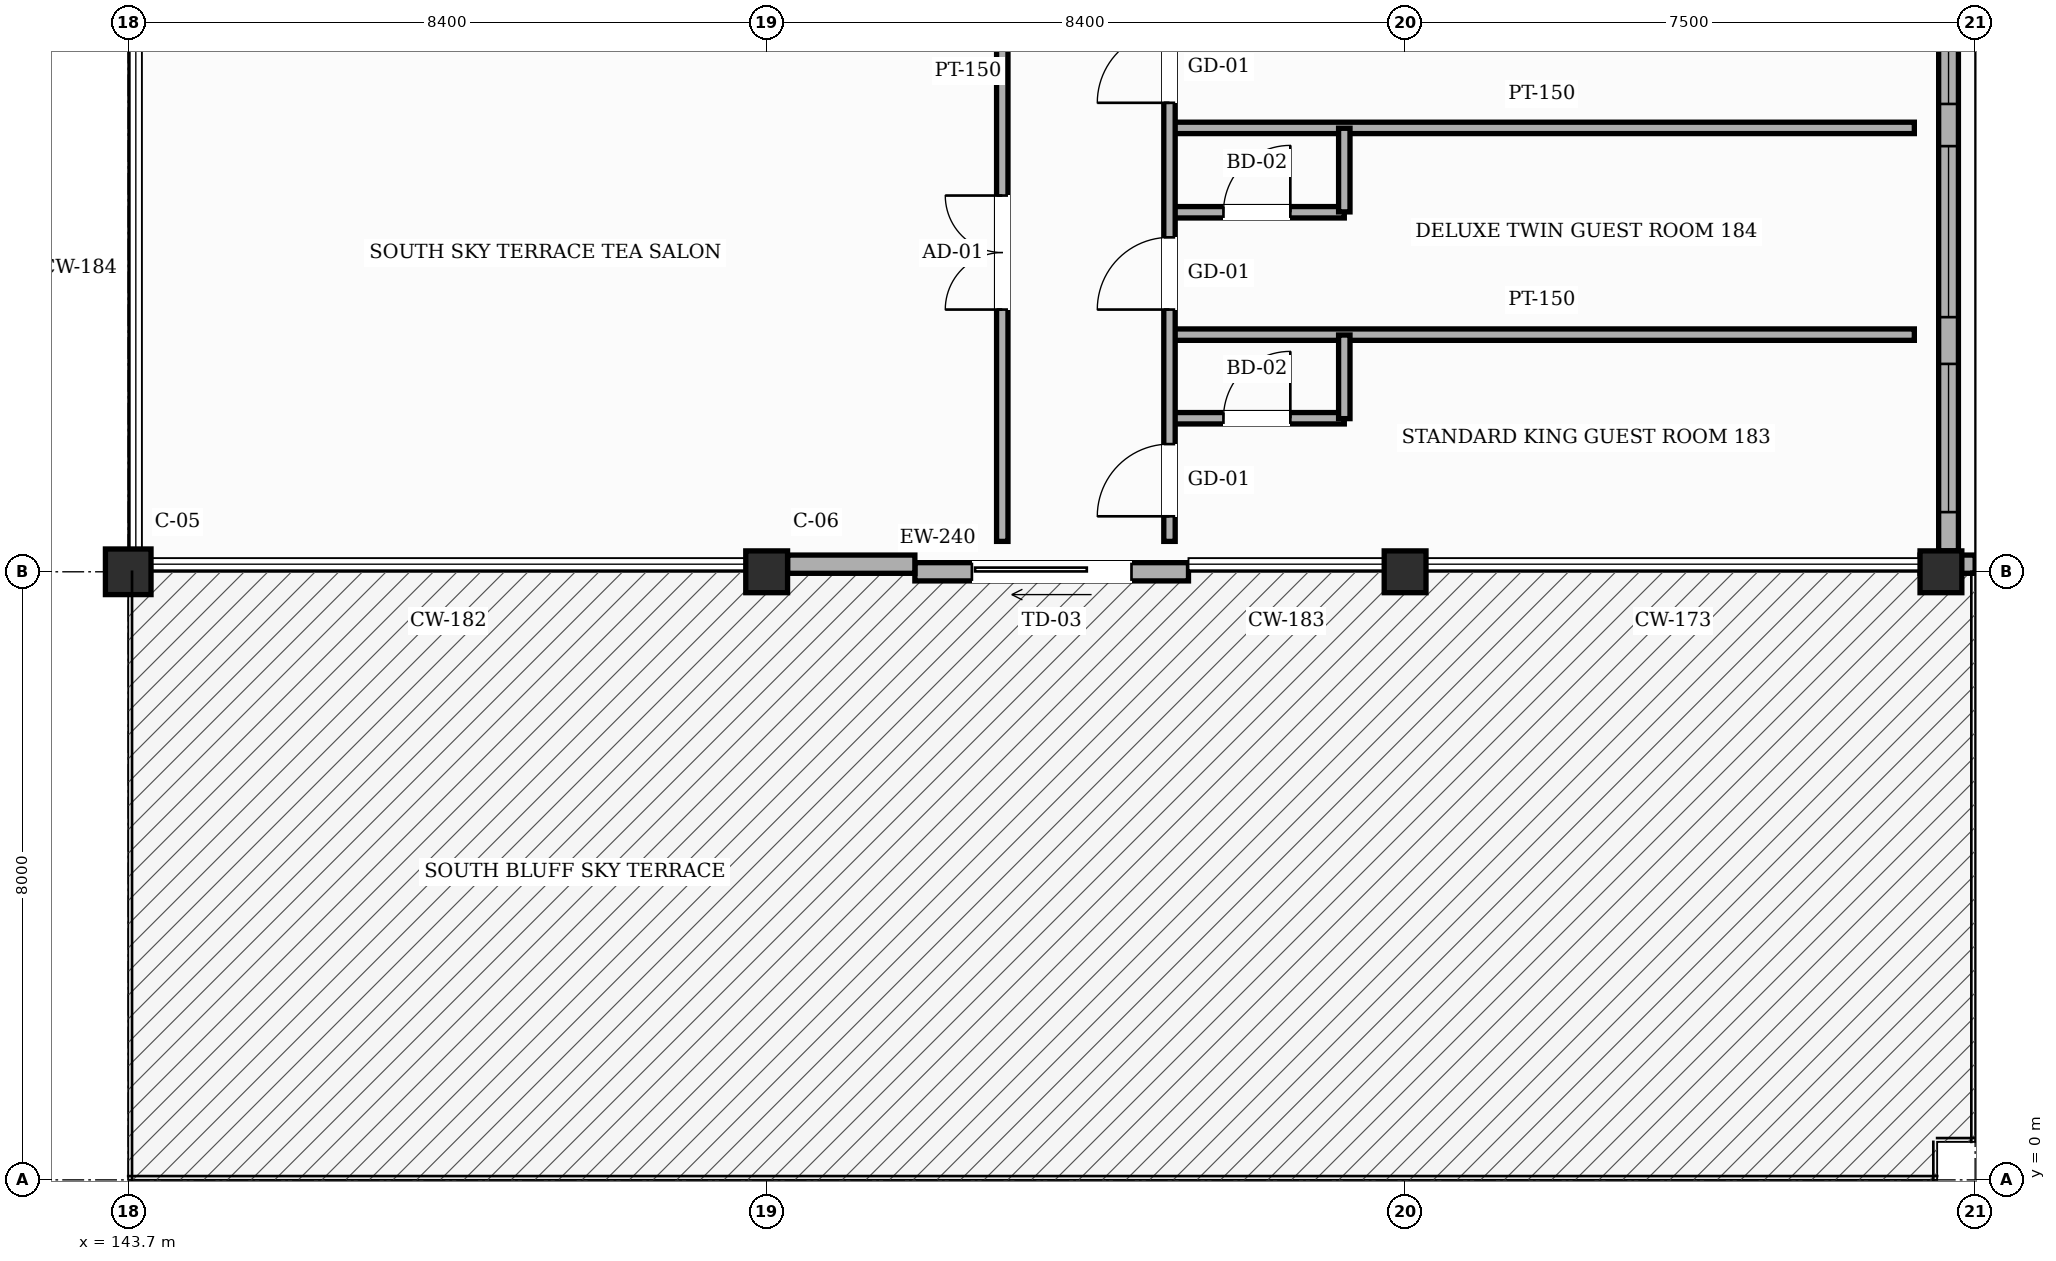
"""IFC4 building model, lengths in metres.
Left out: names, types, materials, properties, quantities, classifications, styles, units other than length and angle.
Written with IfcOpenShell. Run it as: python <this file> out.ifc"""

import sys

from ifc_helpers import new_model, si_unit, direction, frame, frame_2d, origin, origin_2d, place, context, subcontext, project, spatial, rectangle, hollow_rectangle, extrude, element, fill, save


model = new_model("IFC4")
c1 = context("Model", 3, precision=1e-05, world=origin(), true_north=direction((0.0, 1.0)))
c2 = subcontext(c1, "Body", "Model", "MODEL_VIEW")
j1 = project(units=[si_unit("LENGTHUNIT", "METRE"), si_unit("PLANEANGLEUNIT", "RADIAN")], contexts=[c1])
p1 = place(None, origin())
s1 = spatial("IfcSite", under=j1, at=p1, CompositionType="ELEMENT")
p2 = place(p1, origin())
s2 = spatial("IfcBuilding", under=s1, at=p2, CompositionType="ELEMENT")
p3 = place(p2, frame((0.0, 0.0, 31.8)))
s3 = spatial("IfcBuildingStorey", under=s2, at=p3, CompositionType="ELEMENT", Elevation=31.8)
p4 = place(p3, frame((143.7, 8.0, 0.0), z_axis=(0.0, 0.0, 1.0), x_axis=(1.0, 0.0, 0.0)))
e1 = element("IfcColumn", 1, at=p4, inside=s3, PredefinedType="COLUMN", context=c2, shape_type="SweptSolid", body=[
    extrude(hollow_rectangle(XDim=0.6, YDim=0.6, WallThickness=0.025, InnerFilletRadius=0.025, OuterFilletRadius=0.05, at=origin_2d()), origin(), (0.0, 0.0, 1.0), 3.6),
])
for number, where, z_axis, x_axis in (
    (2, (152.1, 8.0, 0.0), (0.0, 0.0, 1.0), (1.0, 0.0, 0.0)),
    (3, (160.5, 8.0, 0.0), (0.0, 0.0, 1.0), (1.0, 0.0, 0.0)),
    (4, (167.55, 8.0, 0.0), (0.0, 0.0, 1.0), (1.0, 0.0, 0.0)),
):
    element("IfcColumn", number, at=place(p3, frame(where, z_axis=z_axis, x_axis=x_axis)), inside=s3, PredefinedType="COLUMN", context=c2, shape_type="SweptSolid", body=[
        extrude(hollow_rectangle(XDim=0.55, YDim=0.55, WallThickness=0.022, InnerFilletRadius=0.022, OuterFilletRadius=0.044, at=origin_2d()), origin(), (0.0, 0.0, 1.0), 3.6),
    ])
p5 = place(p3, frame((167.65, 15.725, 0.0), z_axis=(0.0, 0.0, 1.0), x_axis=(0.0, -1.0, 0.0)))
e5 = element("IfcWall", 5, at=p5, inside=s3, PredefinedType="SOLIDWALL", context=c2, shape_type="SweptSolid", body=[
    extrude(rectangle(XDim=7.45, YDim=0.26, at=frame_2d((3.725, 0.0))), origin(), (0.0, 0.0, 1.0), 2.755),
])
p6 = place(p5, frame((4.99, 0.0, 0.85)))
e6 = element("IfcOpeningElement", 6, at=p6, cuts=e5, PredefinedType="OPENING", context=c2, shape_type="SweptSolid", body=[
    extrude(rectangle(XDim=1.95, YDim=1.35, at=frame_2d((0.975, 0.675))), frame((0.0, 0.14, 0.0), z_axis=(0.0, -1.0, 0.0), x_axis=(1.0, 0.0, 0.0)), (0.0, 0.0, 1.0), 0.28),
])
p7 = place(p5, frame((2.125, 0.0, 0.85)))
e7 = element("IfcOpeningElement", 7, at=p7, cuts=e5, PredefinedType="OPENING", context=c2, shape_type="SweptSolid", body=[
    extrude(rectangle(XDim=2.25, YDim=1.35, at=frame_2d((1.125, 0.675))), frame((0.0, 0.14, 0.0), z_axis=(0.0, -1.0, 0.0), x_axis=(1.0, 0.0, 0.0)), (0.0, 0.0, 1.0), 0.28),
])
p8 = place(p5, frame((0.32, 0.0, 0.85)))
e8 = element("IfcOpeningElement", 8, at=p8, cuts=e5, PredefinedType="OPENING", context=c2, shape_type="SweptSolid", body=[
    extrude(rectangle(XDim=1.25, YDim=1.5, at=frame_2d((0.625, 0.75))), frame((0.0, 0.14, 0.0), z_axis=(0.0, -1.0, 0.0), x_axis=(1.0, 0.0, 0.0)), (0.0, 0.0, 1.0), 0.28),
])
p9 = place(p3, frame((154.05, 8.0, 0.0), z_axis=(0.0, 0.0, 1.0), x_axis=(1.0, 0.0, 0.0)))
e9 = element("IfcWall", 9, at=p9, inside=s3, PredefinedType="SOLIDWALL", context=c2, shape_type="SweptSolid", body=[
    extrude(rectangle(XDim=3.6, YDim=0.24, at=frame_2d((1.8, 0.0))), origin(), (0.0, 0.0, 1.0), 2.755),
])
p10 = place(p9, frame((0.75, 0.0, 0.0)))
e10 = element("IfcOpeningElement", 10, at=p10, cuts=e9, PredefinedType="OPENING", context=c2, shape_type="SweptSolid", body=[
    extrude(rectangle(XDim=2.1, YDim=2.4, at=frame_2d((1.05, 1.2))), frame((0.0, 0.13, 0.0), z_axis=(0.0, -1.0, 0.0), x_axis=(1.0, 0.0, 0.0)), (0.0, 0.0, 1.0), 0.26),
])
p11 = place(p3, frame((154.05, 8.1, 0.0), z_axis=(0.0, 0.0, 1.0), x_axis=(-1.0, 0.0, 0.0)))
e11 = element("IfcWall", 11, at=p11, inside=s3, PredefinedType="SOLIDWALL", context=c2, shape_type="SweptSolid", body=[
    extrude(rectangle(XDim=1.675, YDim=0.24, at=frame_2d((0.837, 0.0))), origin(), (0.0, 0.0, 1.0), 2.755),
])
p12 = place(p3, frame((168.0, 8.1, 0.0), z_axis=(0.0, 0.0, 1.0), x_axis=(-1.0, 0.0, 0.0)))
e12 = element("IfcWall", 12, at=p12, inside=s3, PredefinedType="SOLIDWALL", context=c2, shape_type="SweptSolid", body=[
    extrude(rectangle(XDim=0.725, YDim=0.24, at=frame_2d((0.363, 0.0))), origin(), (0.0, 0.0, 1.0), 3.365),
])
p13 = place(p3, frame((157.4, 10.02, 0.0), z_axis=(0.0, 0.0, 1.0), x_axis=(1.0, 0.0, 0.0)))
e13 = element("IfcWall", 13, at=p13, inside=s3, PredefinedType="PARTITIONING", context=c2, shape_type="SweptSolid", body=[
    extrude(rectangle(XDim=2.3, YDim=0.15, at=frame_2d((1.15, 0.0))), origin(), (0.0, 0.0, 1.0), 3.365),
])
p14 = place(p13, frame((0.71, 0.0, 0.0)))
e14 = element("IfcOpeningElement", 14, at=p14, cuts=e13, PredefinedType="OPENING", context=c2, shape_type="SweptSolid", body=[
    extrude(rectangle(XDim=0.88, YDim=2.12, at=frame_2d((0.44, 1.06))), frame((0.0, 0.085, 0.0), z_axis=(0.0, -1.0, 0.0), x_axis=(1.0, 0.0, 0.0)), (0.0, 0.0, 1.0), 0.17),
])
p15 = place(p3, frame((157.4, 11.12, 0.0), z_axis=(0.0, 0.0, 1.0), x_axis=(1.0, 0.0, 0.0)))
e15 = element("IfcWall", 15, at=p15, inside=s3, PredefinedType="PARTITIONING", context=c2, shape_type="SweptSolid", body=[
    extrude(rectangle(XDim=9.8, YDim=0.15, at=frame_2d((4.9, 0.0))), origin(), (0.0, 0.0, 1.0), 3.365),
])
p16 = place(p3, frame((157.4, 12.73, 0.0), z_axis=(0.0, 0.0, 1.0), x_axis=(1.0, 0.0, 0.0)))
e16 = element("IfcWall", 16, at=p16, inside=s3, PredefinedType="PARTITIONING", context=c2, shape_type="SweptSolid", body=[
    extrude(rectangle(XDim=2.3, YDim=0.15, at=frame_2d((1.15, 0.0))), origin(), (0.0, 0.0, 1.0), 3.365),
])
p17 = place(p16, frame((0.71, 0.0, 0.0)))
e17 = element("IfcOpeningElement", 17, at=p17, cuts=e16, PredefinedType="OPENING", context=c2, shape_type="SweptSolid", body=[
    extrude(rectangle(XDim=0.88, YDim=2.12, at=frame_2d((0.44, 1.06))), frame((0.0, 0.085, 0.0), z_axis=(0.0, -1.0, 0.0), x_axis=(1.0, 0.0, 0.0)), (0.0, 0.0, 1.0), 0.17),
])
p18 = place(p3, frame((157.4, 13.84, 0.0), z_axis=(0.0, 0.0, 1.0), x_axis=(1.0, 0.0, 0.0)))
e18 = element("IfcWall", 18, at=p18, inside=s3, PredefinedType="PARTITIONING", context=c2, shape_type="SweptSolid", body=[
    extrude(rectangle(XDim=9.8, YDim=0.15, at=frame_2d((4.9, 0.0))), origin(), (0.0, 0.0, 1.0), 3.365),
])
p19 = place(p3, frame((155.2, 8.4, 0.0), z_axis=(0.0, 0.0, 1.0), x_axis=(0.0, 1.0, 0.0)))
e19 = element("IfcWall", 19, at=p19, inside=s3, PredefinedType="PARTITIONING", context=c2, shape_type="SweptSolid", body=[
    extrude(rectangle(XDim=18.2, YDim=0.15, at=frame_2d((9.1, 0.0))), origin(), (0.0, 0.0, 1.0), 3.365),
])
p20 = place(p19, frame((3.05, 0.0, 0.0)))
e20 = element("IfcOpeningElement", 20, at=p20, cuts=e19, PredefinedType="OPENING", context=c2, shape_type="SweptSolid", body=[
    extrude(rectangle(XDim=1.5, YDim=2.3, at=frame_2d((0.75, 1.15))), frame((0.0, 0.085, 0.0), z_axis=(0.0, -1.0, 0.0), x_axis=(1.0, 0.0, 0.0)), (0.0, 0.0, 1.0), 0.17),
])
p21 = place(p19, frame((7.825, 0.0, 0.0)))
e21 = element("IfcOpeningElement", 21, at=p21, cuts=e19, PredefinedType="OPENING", context=c2, shape_type="SweptSolid", body=[
    extrude(rectangle(XDim=1.1, YDim=2.2, at=frame_2d((0.55, 1.1))), frame((0.0, 0.085, 0.0), z_axis=(0.0, -1.0, 0.0), x_axis=(1.0, 0.0, 0.0)), (0.0, 0.0, 1.0), 0.17),
])
p22 = place(p19, frame((10.55, 0.0, 0.0)))
e22 = element("IfcOpeningElement", 22, at=p22, cuts=e19, PredefinedType="OPENING", context=c2, shape_type="SweptSolid", body=[
    extrude(rectangle(XDim=0.95, YDim=2.15, at=frame_2d((0.475, 1.075))), frame((0.0, 0.085, 0.0), z_axis=(0.0, -1.0, 0.0), x_axis=(1.0, 0.0, 0.0)), (0.0, 0.0, 1.0), 0.17),
])
p23 = place(p19, frame((13.2, 0.0, 0.0)))
e23 = element("IfcOpeningElement", 23, at=p23, cuts=e19, PredefinedType="OPENING", context=c2, shape_type="SweptSolid", body=[
    extrude(rectangle(XDim=0.95, YDim=2.15, at=frame_2d((0.475, 1.075))), frame((0.0, 0.085, 0.0), z_axis=(0.0, -1.0, 0.0), x_axis=(1.0, 0.0, 0.0)), (0.0, 0.0, 1.0), 0.17),
])
p24 = place(p19, frame((15.85, 0.0, 0.0)))
e24 = element("IfcOpeningElement", 24, at=p24, cuts=e19, PredefinedType="OPENING", context=c2, shape_type="SweptSolid", body=[
    extrude(rectangle(XDim=0.95, YDim=2.15, at=frame_2d((0.475, 1.075))), frame((0.0, 0.085, 0.0), z_axis=(0.0, -1.0, 0.0), x_axis=(1.0, 0.0, 0.0)), (0.0, 0.0, 1.0), 0.17),
])
p25 = place(p3, frame((157.4, 8.4, 0.0), z_axis=(0.0, 0.0, 1.0), x_axis=(0.0, 1.0, 0.0)))
e25 = element("IfcWall", 25, at=p25, inside=s3, PredefinedType="PARTITIONING", context=c2, shape_type="SweptSolid", body=[
    extrude(rectangle(XDim=8.15, YDim=0.15, at=frame_2d((4.075, 0.0))), origin(), (0.0, 0.0, 1.0), 3.365),
])
p26 = place(p25, frame((0.33, 0.0, 0.0)))
e26 = element("IfcOpeningElement", 26, at=p26, cuts=e25, PredefinedType="OPENING", context=c2, shape_type="SweptSolid", body=[
    extrude(rectangle(XDim=0.95, YDim=2.15, at=frame_2d((0.475, 1.075))), frame((0.0, 0.085, 0.0), z_axis=(0.0, -1.0, 0.0), x_axis=(1.0, 0.0, 0.0)), (0.0, 0.0, 1.0), 0.17),
])
p27 = place(p25, frame((3.05, 0.0, 0.0)))
e27 = element("IfcOpeningElement", 27, at=p27, cuts=e25, PredefinedType="OPENING", context=c2, shape_type="SweptSolid", body=[
    extrude(rectangle(XDim=0.95, YDim=2.15, at=frame_2d((0.475, 1.075))), frame((0.0, 0.085, 0.0), z_axis=(0.0, -1.0, 0.0), x_axis=(1.0, 0.0, 0.0)), (0.0, 0.0, 1.0), 0.17),
])
p28 = place(p25, frame((5.77, 0.0, 0.0)))
e28 = element("IfcOpeningElement", 28, at=p28, cuts=e25, PredefinedType="OPENING", context=c2, shape_type="SweptSolid", body=[
    extrude(rectangle(XDim=0.95, YDim=2.15, at=frame_2d((0.475, 1.075))), frame((0.0, 0.085, 0.0), z_axis=(0.0, -1.0, 0.0), x_axis=(1.0, 0.0, 0.0)), (0.0, 0.0, 1.0), 0.17),
])
p29 = place(p3, frame((159.7, 10.015, 0.0), z_axis=(0.0, 0.0, 1.0), x_axis=(0.0, 1.0, 0.0)))
e29 = element("IfcWall", 29, at=p29, inside=s3, PredefinedType="PARTITIONING", context=c2, shape_type="SweptSolid", body=[
    extrude(rectangle(XDim=1.1, YDim=0.15, at=frame_2d((0.55, 0.0))), origin(), (0.0, 0.0, 1.0), 3.365),
])
p30 = place(p3, frame((159.7, 12.735, 0.0), z_axis=(0.0, 0.0, 1.0), x_axis=(0.0, 1.0, 0.0)))
e30 = element("IfcWall", 30, at=p30, inside=s3, PredefinedType="PARTITIONING", context=c2, shape_type="SweptSolid", body=[
    extrude(rectangle(XDim=1.1, YDim=0.15, at=frame_2d((0.55, 0.0))), origin(), (0.0, 0.0, 1.0), 3.365),
])
p31 = place(p6, origin())
e31 = element("IfcWindow", 31, at=p31, inside=s3, PartitioningType="SINGLE_PANEL", PredefinedType="WINDOW", context=c2, shape_type="SweptSolid", body=[
    extrude(rectangle(XDim=1.95, YDim=1.35, at=frame_2d((0.975, 0.675))), frame((0.0, 0.03, 0.0), z_axis=(0.0, -1.0, 0.0), x_axis=(1.0, 0.0, 0.0)), (0.0, 0.0, 1.0), 0.06),
])
fill(e6, e31)
p32 = place(p7, origin())
e32 = element("IfcWindow", 32, at=p32, inside=s3, PartitioningType="SINGLE_PANEL", PredefinedType="WINDOW", context=c2, shape_type="SweptSolid", body=[
    extrude(rectangle(XDim=2.25, YDim=1.35, at=frame_2d((1.125, 0.675))), frame((0.0, 0.03, 0.0), z_axis=(0.0, -1.0, 0.0), x_axis=(1.0, 0.0, 0.0)), (0.0, 0.0, 1.0), 0.06),
])
fill(e7, e32)
p33 = place(p8, origin())
e33 = element("IfcWindow", 33, at=p33, inside=s3, PartitioningType="SINGLE_PANEL", PredefinedType="WINDOW", context=c2, shape_type="SweptSolid", body=[
    extrude(rectangle(XDim=1.25, YDim=1.5, at=frame_2d((0.625, 0.75))), frame((0.0, 0.03, 0.0), z_axis=(0.0, -1.0, 0.0), x_axis=(1.0, 0.0, 0.0)), (0.0, 0.0, 1.0), 0.06),
])
fill(e8, e33)
p34 = place(p10, origin())
e34 = element("IfcDoor", 34, at=p34, inside=s3, OperationType="SLIDING_TO_LEFT", PredefinedType="DOOR", context=c2, shape_type="SweptSolid", body=[
    extrude(rectangle(XDim=2.1, YDim=2.4, at=frame_2d((1.05, 1.2))), frame((0.0, 0.025, 0.0), z_axis=(0.0, -1.0, 0.0), x_axis=(1.0, 0.0, 0.0)), (0.0, 0.0, 1.0), 0.05),
])
fill(e10, e34)
p35 = place(p20, origin())
e35 = element("IfcDoor", 35, at=p35, inside=s3, OperationType="DOUBLE_DOOR_SINGLE_SWING", PredefinedType="DOOR", context=c2, shape_type="SweptSolid", body=[
    extrude(rectangle(XDim=1.5, YDim=2.3, at=frame_2d((0.75, 1.15))), frame((0.0, 0.025, 0.0), z_axis=(0.0, -1.0, 0.0), x_axis=(1.0, 0.0, 0.0)), (0.0, 0.0, 1.0), 0.05),
])
fill(e20, e35)
p36 = place(p26, origin())
e36 = element("IfcDoor", 36, at=p36, inside=s3, OperationType="SINGLE_SWING_LEFT", PredefinedType="DOOR", context=c2, shape_type="SweptSolid", body=[
    extrude(rectangle(XDim=0.95, YDim=2.15, at=frame_2d((0.475, 1.075))), frame((0.0, 0.025, 0.0), z_axis=(0.0, -1.0, 0.0), x_axis=(1.0, 0.0, 0.0)), (0.0, 0.0, 1.0), 0.05),
])
fill(e26, e36)
p37 = place(p14, origin())
e37 = element("IfcDoor", 37, at=p37, inside=s3, OperationType="SINGLE_SWING_RIGHT", PredefinedType="DOOR", context=c2, shape_type="SweptSolid", body=[
    extrude(rectangle(XDim=0.88, YDim=2.12, at=frame_2d((0.44, 1.06))), frame((0.0, 0.025, 0.0), z_axis=(0.0, -1.0, 0.0), x_axis=(1.0, 0.0, 0.0)), (0.0, 0.0, 1.0), 0.05),
])
fill(e14, e37)
p38 = place(p27, origin())
e38 = element("IfcDoor", 38, at=p38, inside=s3, OperationType="SINGLE_SWING_LEFT", PredefinedType="DOOR", context=c2, shape_type="SweptSolid", body=[
    extrude(rectangle(XDim=0.95, YDim=2.15, at=frame_2d((0.475, 1.075))), frame((0.0, 0.025, 0.0), z_axis=(0.0, -1.0, 0.0), x_axis=(1.0, 0.0, 0.0)), (0.0, 0.0, 1.0), 0.05),
])
fill(e27, e38)
p39 = place(p17, origin())
e39 = element("IfcDoor", 39, at=p39, inside=s3, OperationType="SINGLE_SWING_RIGHT", PredefinedType="DOOR", context=c2, shape_type="SweptSolid", body=[
    extrude(rectangle(XDim=0.88, YDim=2.12, at=frame_2d((0.44, 1.06))), frame((0.0, 0.025, 0.0), z_axis=(0.0, -1.0, 0.0), x_axis=(1.0, 0.0, 0.0)), (0.0, 0.0, 1.0), 0.05),
])
fill(e17, e39)
p40 = place(p28, origin())
e40 = element("IfcDoor", 40, at=p40, inside=s3, OperationType="SINGLE_SWING_LEFT", PredefinedType="DOOR", context=c2, shape_type="SweptSolid", body=[
    extrude(rectangle(XDim=0.95, YDim=2.15, at=frame_2d((0.475, 1.075))), frame((0.0, 0.025, 0.0), z_axis=(0.0, -1.0, 0.0), x_axis=(1.0, 0.0, 0.0)), (0.0, 0.0, 1.0), 0.05),
])
fill(e28, e40)
save(model, sys.argv[1])
